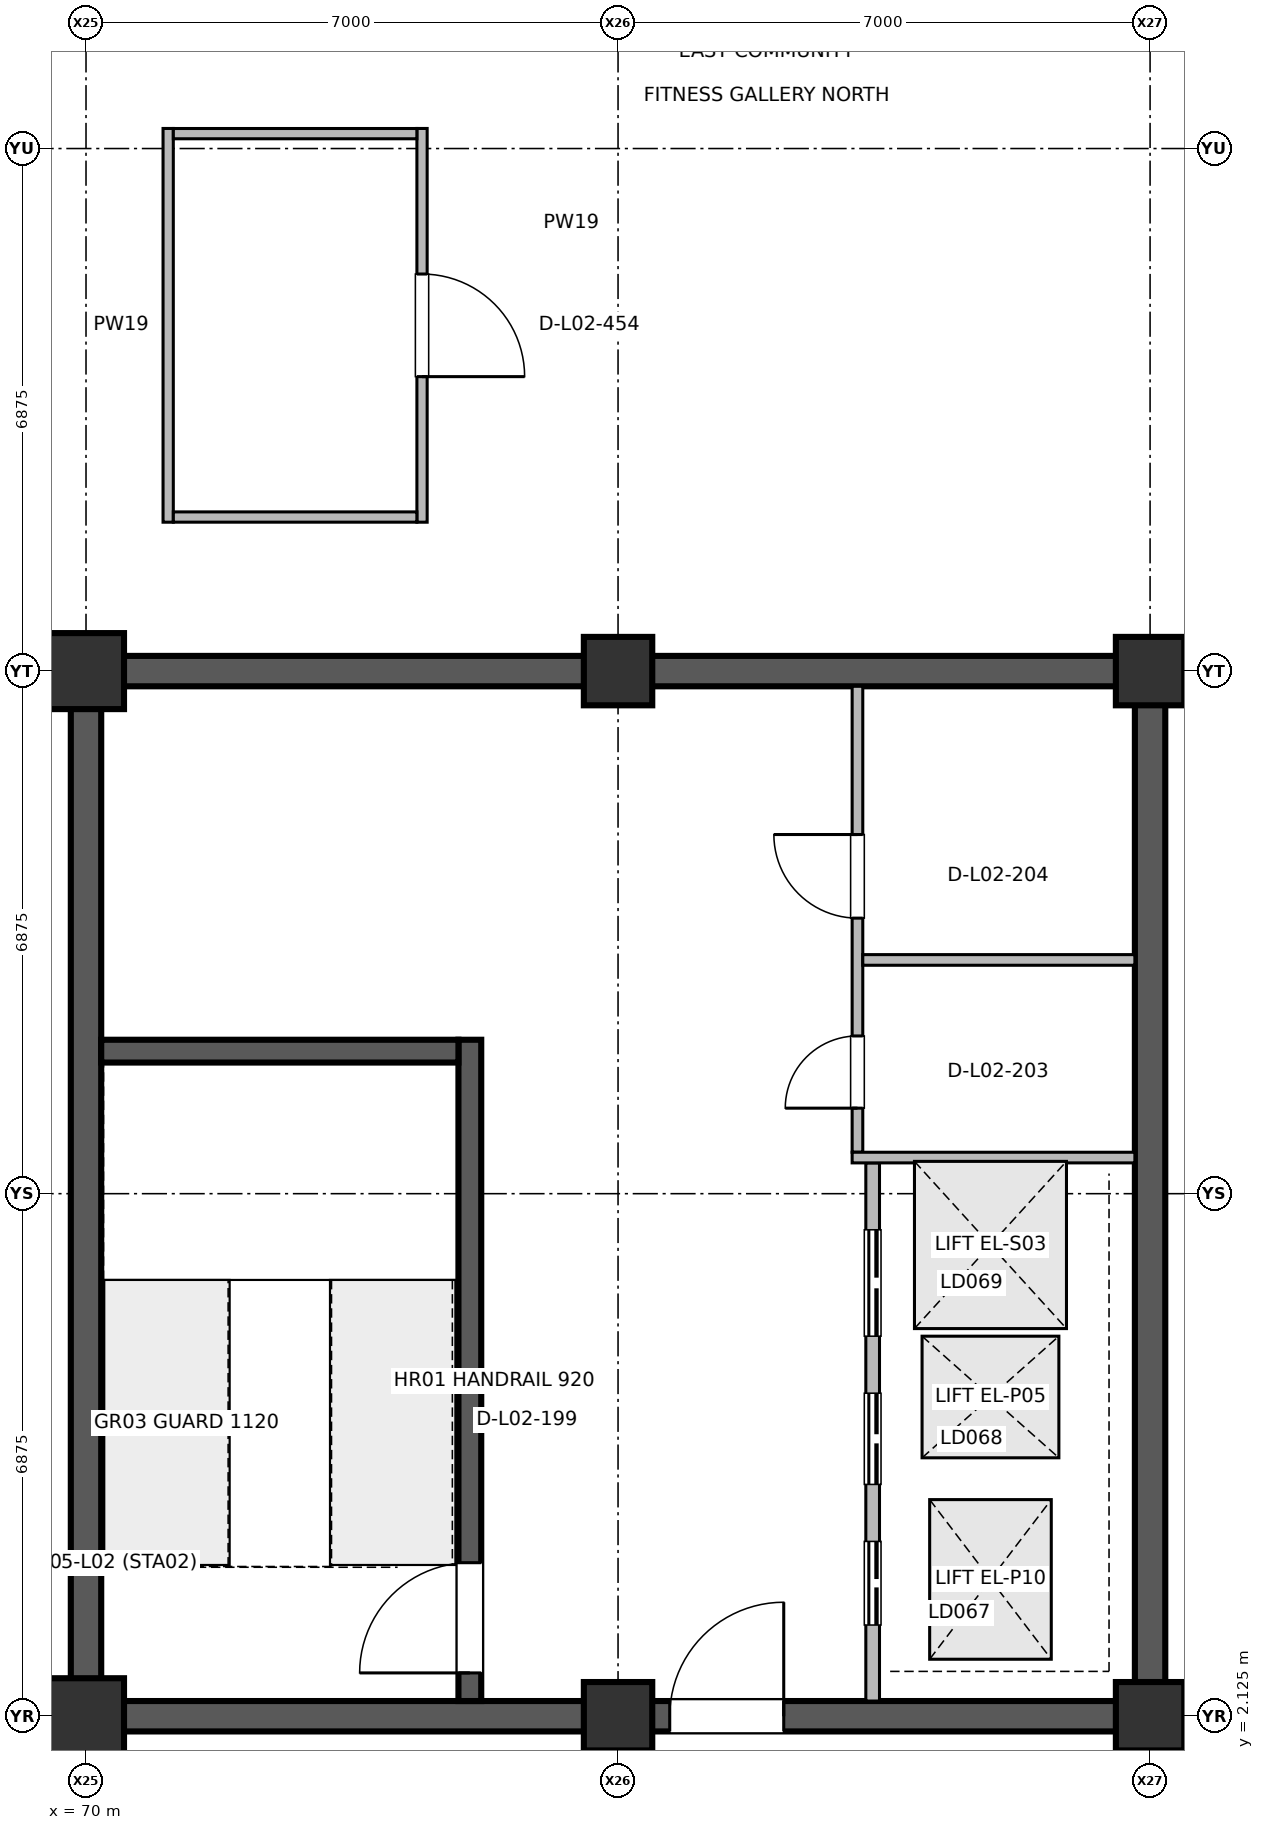
"""IFC4 building model, lengths in metres.
Left out: names, types, materials, properties, quantities, classifications, styles, units other than length and angle.
Written with IfcOpenShell. Run it as: python <this file> out.ifc"""

import sys

from ifc_helpers import new_model, si_unit, direction, frame, frame_2d, origin, origin_2d, place, context, subcontext, project, spatial, rectangle, extrude, element, fill, save


model = new_model("IFC4")
c1 = context("Model", 3, precision=1e-05, world=origin(), true_north=direction((0.0, 1.0)))
c2 = subcontext(c1, "Body", "Model", "MODEL_VIEW")
j1 = project(units=[si_unit("LENGTHUNIT", "METRE"), si_unit("PLANEANGLEUNIT", "RADIAN")], contexts=[c1])
p1 = place(None, origin())
s1 = spatial("IfcSite", under=j1, at=p1, CompositionType="ELEMENT")
p2 = place(p1, origin())
s2 = spatial("IfcBuilding", under=s1, at=p2, CompositionType="ELEMENT")
p3 = place(p2, frame((0.0, 0.0, 6.0)))
s3 = spatial("IfcBuildingStorey", under=s2, at=p3, CompositionType="ELEMENT", Elevation=6.0)
for number, where, z_axis, x_axis in (
    (1, (70.0, 2.125, 0.0), (0.0, 0.0, 1.0), (1.0, 0.0, 0.0)),
    (2, (70.0, 15.875, 0.0), (0.0, 0.0, 1.0), (1.0, 0.0, 0.0)),
):
    element("IfcColumn", number, at=place(p3, frame(where, z_axis=z_axis, x_axis=x_axis)), inside=s3, PredefinedType="COLUMN", context=c2, shape_type="SweptSolid", body=[
        extrude(rectangle(XDim=1.0, YDim=1.0, at=origin_2d()), origin(), (0.0, 0.0, 1.0), 5.398),
    ])
for number, where, z_axis, x_axis in (
    (3, (77.0, 2.125, 0.0), (0.0, 0.0, 1.0), (1.0, 0.0, 0.0)),
    (4, (77.0, 15.875, 0.0), (0.0, 0.0, 1.0), (1.0, 0.0, 0.0)),
    (5, (84.0, 2.125, 0.0), (0.0, 0.0, 1.0), (1.0, 0.0, 0.0)),
    (6, (84.0, 15.875, 0.0), (0.0, 0.0, 1.0), (1.0, 0.0, 0.0)),
):
    element("IfcColumn", number, at=place(p3, frame(where, z_axis=z_axis, x_axis=x_axis)), inside=s3, PredefinedType="COLUMN", context=c2, shape_type="SweptSolid", body=[
        extrude(rectangle(XDim=0.9, YDim=0.9, at=origin_2d()), origin(), (0.0, 0.0, 1.0), 5.398),
    ])
for number, where, z_axis, x_axis in (
    (7, (70.0, 2.325, 0.0), (0.0, 0.0, 1.0), (0.0, 1.0, 0.0)),
    (8, (84.0, 2.325, 0.0), (0.0, 0.0, 1.0), (0.0, 1.0, 0.0)),
):
    element("IfcWall", number, at=place(p3, frame(where, z_axis=z_axis, x_axis=x_axis)), inside=s3, PredefinedType="SHEAR", context=c2, shape_type="SweptSolid", body=[
        extrude(rectangle(XDim=13.35, YDim=0.4, at=frame_2d((6.675, 0.0))), origin(), (0.0, 0.0, 1.0), 5.15),
    ])
p4 = place(p3, frame((70.2, 2.125, 0.0), z_axis=(0.0, 0.0, 1.0), x_axis=(1.0, 0.0, 0.0)))
e9 = element("IfcWall", 9, at=p4, inside=s3, PredefinedType="SHEAR", context=c2, shape_type="SweptSolid", body=[
    extrude(rectangle(XDim=13.6, YDim=0.4, at=frame_2d((6.8, 0.0))), origin(), (0.0, 0.0, 1.0), 5.15),
])
p5 = place(p4, frame((7.48, 0.0, 0.0)))
e10 = element("IfcOpeningElement", 10, at=p5, cuts=e9, PredefinedType="OPENING", context=c2, shape_type="SweptSolid", body=[
    extrude(rectangle(XDim=1.5, YDim=2.2, at=frame_2d((0.75, 1.1))), frame((0.0, 0.21, 0.0), z_axis=(0.0, -1.0, 0.0), x_axis=(1.0, 0.0, 0.0)), (0.0, 0.0, 1.0), 0.42),
])
p6 = place(p3, frame((70.2, 15.875, 0.0), z_axis=(0.0, 0.0, 1.0), x_axis=(1.0, 0.0, 0.0)))
e11 = element("IfcWall", 11, at=p6, inside=s3, PredefinedType="SHEAR", context=c2, shape_type="SweptSolid", body=[
    extrude(rectangle(XDim=13.6, YDim=0.4, at=frame_2d((6.8, 0.0))), origin(), (0.0, 0.0, 1.0), 5.15),
])
p7 = place(p3, frame((75.05, 2.325, 0.0), z_axis=(0.0, 0.0, 1.0), x_axis=(0.0, 1.0, 0.0)))
e12 = element("IfcWall", 12, at=p7, inside=s3, PredefinedType="SHEAR", context=c2, shape_type="SweptSolid", body=[
    extrude(rectangle(XDim=8.7, YDim=0.3, at=frame_2d((4.35, 0.0))), origin(), (0.0, 0.0, 1.0), 5.15),
])
p8 = place(p7, frame((0.37, 0.0, 0.0)))
e13 = element("IfcOpeningElement", 13, at=p8, cuts=e12, PredefinedType="OPENING", context=c2, shape_type="SweptSolid", body=[
    extrude(rectangle(XDim=1.45, YDim=2.2, at=frame_2d((0.725, 1.1))), frame((0.0, 0.16, 0.0), z_axis=(0.0, -1.0, 0.0), x_axis=(1.0, 0.0, 0.0)), (0.0, 0.0, 1.0), 0.32),
])
p9 = place(p3, frame((80.35, 2.325, 0.0), z_axis=(0.0, 0.0, 1.0), x_axis=(0.0, 1.0, 0.0)))
e14 = element("IfcWall", 14, at=p9, inside=s3, PredefinedType="PARTITIONING", context=c2, shape_type="SweptSolid", body=[
    extrude(rectangle(XDim=7.08, YDim=0.18, at=frame_2d((3.54, 0.0))), origin(), (0.0, 0.0, 1.0), 4.42),
])
p10 = place(p9, frame((1.0, 0.0, 0.0)))
e15 = element("IfcOpeningElement", 15, at=p10, cuts=e14, PredefinedType="OPENING", context=c2, shape_type="SweptSolid", body=[
    extrude(rectangle(XDim=1.1, YDim=2.2, at=frame_2d((0.55, 1.1))), frame((0.0, 0.1, 0.0), z_axis=(0.0, -1.0, 0.0), x_axis=(1.0, 0.0, 0.0)), (0.0, 0.0, 1.0), 0.2),
])
p11 = place(p9, frame((2.85, 0.0, 0.0)))
e16 = element("IfcOpeningElement", 16, at=p11, cuts=e14, PredefinedType="OPENING", context=c2, shape_type="SweptSolid", body=[
    extrude(rectangle(XDim=1.2, YDim=2.25, at=frame_2d((0.6, 1.125))), frame((0.0, 0.1, 0.0), z_axis=(0.0, -1.0, 0.0), x_axis=(1.0, 0.0, 0.0)), (0.0, 0.0, 1.0), 0.2),
])
p12 = place(p9, frame((4.8, 0.0, 0.0)))
e17 = element("IfcOpeningElement", 17, at=p12, cuts=e14, PredefinedType="OPENING", context=c2, shape_type="SweptSolid", body=[
    extrude(rectangle(XDim=1.4, YDim=2.3, at=frame_2d((0.7, 1.15))), frame((0.0, 0.1, 0.0), z_axis=(0.0, -1.0, 0.0), x_axis=(1.0, 0.0, 0.0)), (0.0, 0.0, 1.0), 0.2),
])
p13 = place(p3, frame((80.15, 9.545, 0.0), z_axis=(0.0, 0.0, 1.0), x_axis=(0.0, 1.0, 0.0)))
e18 = element("IfcWall", 18, at=p13, inside=s3, PredefinedType="PARTITIONING", context=c2, shape_type="SweptSolid", body=[
    extrude(rectangle(XDim=6.13, YDim=0.14, at=frame_2d((3.065, 0.0))), origin(), (0.0, 0.0, 1.0), 4.42),
])
p14 = place(p13, frame((0.58, 0.0, 0.0)))
e19 = element("IfcOpeningElement", 19, at=p14, cuts=e18, PredefinedType="OPENING", context=c2, shape_type="SweptSolid", body=[
    extrude(rectangle(XDim=0.95, YDim=2.15, at=frame_2d((0.475, 1.075))), frame((0.0, 0.08, 0.0), z_axis=(0.0, -1.0, 0.0), x_axis=(1.0, 0.0, 0.0)), (0.0, 0.0, 1.0), 0.16),
])
p15 = place(p13, frame((3.08, 0.0, 0.0)))
e20 = element("IfcOpeningElement", 20, at=p15, cuts=e18, PredefinedType="OPENING", context=c2, shape_type="SweptSolid", body=[
    extrude(rectangle(XDim=1.1, YDim=2.15, at=frame_2d((0.55, 1.075))), frame((0.0, 0.08, 0.0), z_axis=(0.0, -1.0, 0.0), x_axis=(1.0, 0.0, 0.0)), (0.0, 0.0, 1.0), 0.16),
])
p16 = place(p3, frame((74.421, 23.014, 0.0), z_axis=(0.0, 0.0, 1.0), x_axis=(0.0, -1.0, 0.0)))
e21 = element("IfcWall", 21, at=p16, inside=s3, PredefinedType="PARTITIONING", context=c2, shape_type="SweptSolid", body=[
    extrude(rectangle(XDim=5.18, YDim=0.135, at=frame_2d((2.59, 0.0))), origin(), (0.0, 0.0, 1.0), 4.42),
])
p17 = place(p16, frame((1.915, 0.0, 0.0)))
e22 = element("IfcOpeningElement", 22, at=p17, cuts=e21, PredefinedType="OPENING", context=c2, shape_type="SweptSolid", body=[
    extrude(rectangle(XDim=1.35, YDim=2.2, at=frame_2d((0.675, 1.1))), frame((0.0, 0.077, 0.0), z_axis=(0.0, -1.0, 0.0), x_axis=(1.0, 0.0, 0.0)), (0.0, 0.0, 1.0), 0.155),
])
p18 = place(p3, frame((80.08, 9.475, 0.0), z_axis=(0.0, 0.0, 1.0), x_axis=(1.0, 0.0, 0.0)))
e23 = element("IfcWall", 23, at=p18, inside=s3, PredefinedType="PARTITIONING", context=c2, shape_type="SweptSolid", body=[
    extrude(rectangle(XDim=3.72, YDim=0.14, at=frame_2d((1.86, 0.0))), origin(), (0.0, 0.0, 1.0), 4.42),
])
p19 = place(p3, frame((80.22, 12.075, 0.0), z_axis=(0.0, 0.0, 1.0), x_axis=(1.0, 0.0, 0.0)))
e24 = element("IfcWall", 24, at=p19, inside=s3, PredefinedType="PARTITIONING", context=c2, shape_type="SweptSolid", body=[
    extrude(rectangle(XDim=3.58, YDim=0.14, at=frame_2d((1.79, 0.0))), origin(), (0.0, 0.0, 1.0), 4.42),
])
p20 = place(p3, frame((71.081, 17.834, 0.0), z_axis=(0.0, 0.0, 1.0), x_axis=(0.0, 1.0, 0.0)))
e25 = element("IfcWall", 25, at=p20, inside=s3, PredefinedType="PARTITIONING", context=c2, shape_type="SweptSolid", body=[
    extrude(rectangle(XDim=5.18, YDim=0.135, at=frame_2d((2.59, 0.0))), origin(), (0.0, 0.0, 1.0), 4.42),
])
for number, where, z_axis, x_axis in (
    (26, (71.149, 17.902, 0.0), (0.0, 0.0, 1.0), (1.0, 0.0, 0.0)),
    (27, (71.149, 22.946, 0.0), (0.0, 0.0, 1.0), (1.0, 0.0, 0.0)),
):
    element("IfcWall", number, at=place(p3, frame(where, z_axis=z_axis, x_axis=x_axis)), inside=s3, PredefinedType="PARTITIONING", context=c2, shape_type="SweptSolid", body=[
        extrude(rectangle(XDim=3.204, YDim=0.135, at=frame_2d((1.602, 0.0))), origin(), (0.0, 0.0, 1.0), 4.42),
    ])
p21 = place(p3, frame((70.2, 10.875, 0.0), z_axis=(0.0, 0.0, 1.0), x_axis=(1.0, 0.0, 0.0)))
e28 = element("IfcWall", 28, at=p21, inside=s3, PredefinedType="SHEAR", context=c2, shape_type="SweptSolid", body=[
    extrude(rectangle(XDim=4.7, YDim=0.3, at=frame_2d((2.35, 0.0))), origin(), (0.0, 0.0, 1.0), 5.15),
])
p22 = place(p5, origin())
e29 = element("IfcDoor", 29, at=p22, inside=s3, OperationType="SINGLE_SWING_RIGHT", PredefinedType="DOOR", context=c2, shape_type="SweptSolid", body=[
    extrude(rectangle(XDim=1.5, YDim=2.2, at=frame_2d((0.75, 1.1))), frame((0.0, 0.025, 0.0), z_axis=(0.0, -1.0, 0.0), x_axis=(1.0, 0.0, 0.0)), (0.0, 0.0, 1.0), 0.05),
])
fill(e10, e29)
p23 = place(p8, origin())
e30 = element("IfcDoor", 30, at=p23, inside=s3, OperationType="SINGLE_SWING_LEFT", PredefinedType="DOOR", context=c2, shape_type="SweptSolid", body=[
    extrude(rectangle(XDim=1.45, YDim=2.2, at=frame_2d((0.725, 1.1))), frame((0.0, 0.025, 0.0), z_axis=(0.0, -1.0, 0.0), x_axis=(1.0, 0.0, 0.0)), (0.0, 0.0, 1.0), 0.05),
])
fill(e13, e30)
p24 = place(p10, origin())
e31 = element("IfcDoor", 31, at=p24, inside=s3, OperationType="DOUBLE_DOOR_SLIDING", PredefinedType="DOOR", context=c2, shape_type="SweptSolid", body=[
    extrude(rectangle(XDim=1.1, YDim=2.2, at=frame_2d((0.55, 1.1))), frame((0.0, 0.025, 0.0), z_axis=(0.0, -1.0, 0.0), x_axis=(1.0, 0.0, 0.0)), (0.0, 0.0, 1.0), 0.05),
])
fill(e15, e31)
p25 = place(p11, origin())
e32 = element("IfcDoor", 32, at=p25, inside=s3, OperationType="DOUBLE_DOOR_SLIDING", PredefinedType="DOOR", context=c2, shape_type="SweptSolid", body=[
    extrude(rectangle(XDim=1.2, YDim=2.25, at=frame_2d((0.6, 1.125))), frame((0.0, 0.025, 0.0), z_axis=(0.0, -1.0, 0.0), x_axis=(1.0, 0.0, 0.0)), (0.0, 0.0, 1.0), 0.05),
])
fill(e16, e32)
p26 = place(p12, origin())
e33 = element("IfcDoor", 33, at=p26, inside=s3, OperationType="DOUBLE_DOOR_SLIDING", PredefinedType="DOOR", context=c2, shape_type="SweptSolid", body=[
    extrude(rectangle(XDim=1.4, YDim=2.3, at=frame_2d((0.7, 1.15))), frame((0.0, 0.025, 0.0), z_axis=(0.0, -1.0, 0.0), x_axis=(1.0, 0.0, 0.0)), (0.0, 0.0, 1.0), 0.05),
])
fill(e17, e33)
p27 = place(p14, origin())
e34 = element("IfcDoor", 34, at=p27, inside=s3, OperationType="SINGLE_SWING_LEFT", PredefinedType="DOOR", context=c2, shape_type="SweptSolid", body=[
    extrude(rectangle(XDim=0.95, YDim=2.15, at=frame_2d((0.475, 1.075))), frame((0.0, 0.025, 0.0), z_axis=(0.0, -1.0, 0.0), x_axis=(1.0, 0.0, 0.0)), (0.0, 0.0, 1.0), 0.05),
])
fill(e19, e34)
p28 = place(p15, origin())
e35 = element("IfcDoor", 35, at=p28, inside=s3, OperationType="SINGLE_SWING_RIGHT", PredefinedType="DOOR", context=c2, shape_type="SweptSolid", body=[
    extrude(rectangle(XDim=1.1, YDim=2.15, at=frame_2d((0.55, 1.075))), frame((0.0, 0.025, 0.0), z_axis=(0.0, -1.0, 0.0), x_axis=(1.0, 0.0, 0.0)), (0.0, 0.0, 1.0), 0.05),
])
fill(e20, e35)
p29 = place(p17, origin())
e36 = element("IfcDoor", 36, at=p29, inside=s3, OperationType="SINGLE_SWING_RIGHT", PredefinedType="DOOR", context=c2, shape_type="SweptSolid", body=[
    extrude(rectangle(XDim=1.35, YDim=2.2, at=frame_2d((0.675, 1.1))), frame((0.0, 0.025, 0.0), z_axis=(0.0, -1.0, 0.0), x_axis=(1.0, 0.0, 0.0)), (0.0, 0.0, 1.0), 0.05),
])
fill(e22, e36)
save(model, sys.argv[1])
